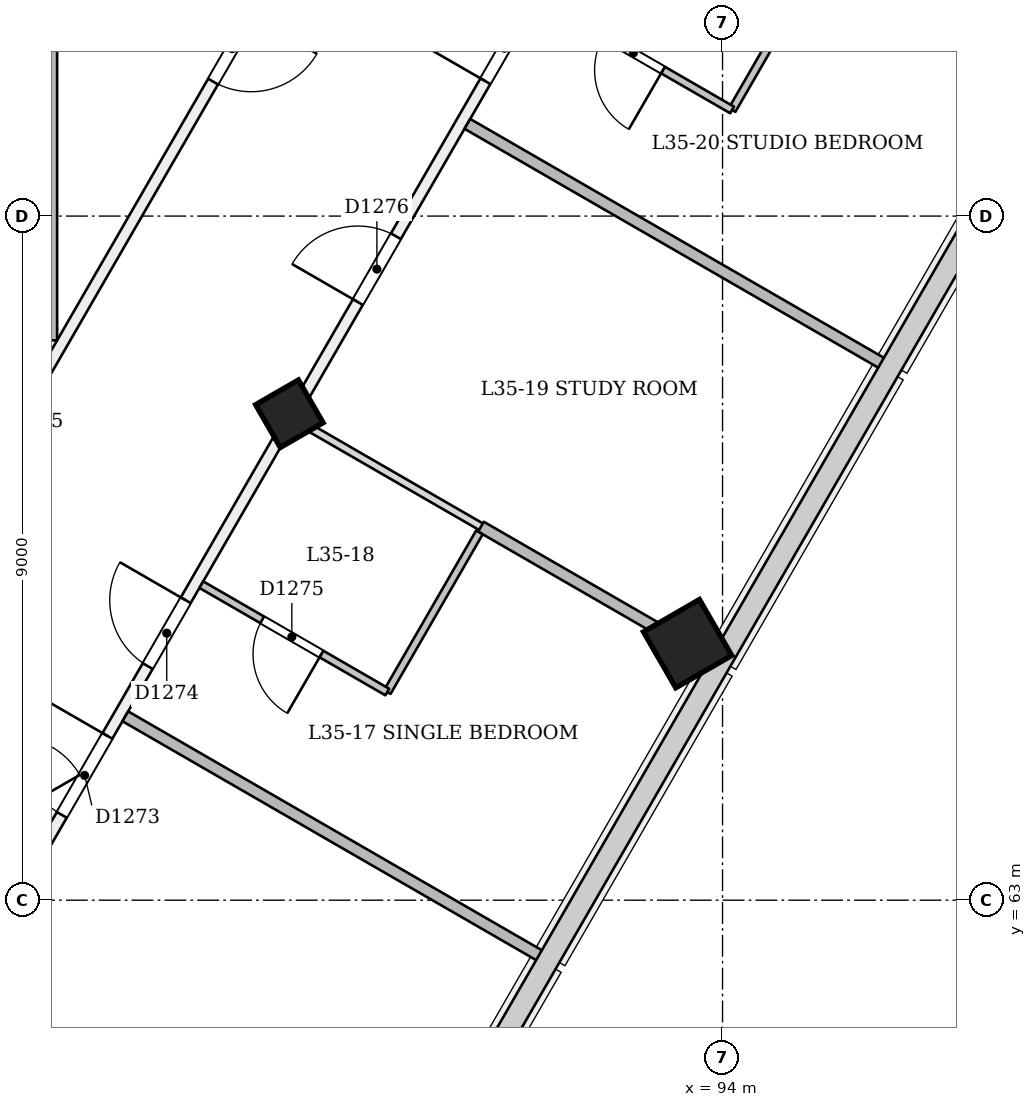
"""IFC4 building model, lengths in metres.
Left out: names, types, materials, properties, quantities, classifications, styles, units other than length and angle.
Written with IfcOpenShell. Run it as: python <this file> out.ifc"""

import sys

from ifc_helpers import new_model, si_unit, direction, frame, frame_2d, origin, origin_2d, place, context, subcontext, project, spatial, rectangle, extrude, element, fill, save


model = new_model("IFC4")
c1 = context("Model", 3, precision=1e-05, world=origin(), true_north=direction((0.0, 1.0)))
c2 = subcontext(c1, "Body", "Model", "MODEL_VIEW")
j1 = project(units=[si_unit("LENGTHUNIT", "METRE"), si_unit("PLANEANGLEUNIT", "RADIAN")], contexts=[c1])
p1 = place(None, origin())
s1 = spatial("IfcSite", under=j1, at=p1, CompositionType="ELEMENT")
p2 = place(p1, origin())
s2 = spatial("IfcBuilding", under=s1, at=p2, CompositionType="ELEMENT")
p3 = place(p2, frame((0.0, 0.0, 138.6)))
s3 = spatial("IfcBuildingStorey", under=s2, at=p3, CompositionType="ELEMENT", Elevation=138.6)
p4 = place(p3, frame((88.328, 69.353, -0.02), z_axis=(-0.022222852987, 0.038483477124, 0.999012095419), x_axis=(-0.500171952231, -0.865640981329, 0.022219577963)))
e1 = element("IfcColumn", 1, at=p4, inside=s3, PredefinedType="COLUMN", context=c2, shape_type="SweptSolid", body=[
    extrude(rectangle(XDim=0.65, YDim=0.65, at=origin_2d()), origin(), (0.0, 0.0, 1.0), 3.604),
])
p5 = place(p3, frame((93.568, 66.328, -0.026), z_axis=(-0.02215369191, 0.038413282303, 0.999016333038), x_axis=(-0.500654753295, -0.865363059712, 0.022171894109)))
e2 = element("IfcColumn", 2, at=p5, inside=s3, PredefinedType="COLUMN", context=c2, shape_type="SweptSolid", body=[
    extrude(rectangle(XDim=0.85, YDim=0.85, at=origin_2d()), origin(), (0.0, 0.0, 1.0), 3.604),
])
p6 = place(p3, frame((96.784, 90.2, 0.0), z_axis=(0.0, 0.0, 1.0), x_axis=(-0.499996251233, -0.866027568125, 0.0)))
e3 = element("IfcWall", 3, at=p6, inside=s3, PredefinedType="PARTITIONING", context=c2, shape_type="SweptSolid", body=[
    extrude(rectangle(XDim=23.568, YDim=0.15, at=frame_2d((11.784, 0.0))), origin(), (0.0, 0.0, 1.0), 3.15),
])
p7 = place(p6, frame((17.972, 0.0, 0.0)))
e4 = element("IfcOpeningElement", 4, at=p7, cuts=e3, PredefinedType="OPENING", context=c2, shape_type="SweptSolid", body=[
    extrude(rectangle(XDim=1.0, YDim=2.1, at=frame_2d((0.5, 1.05))), frame((0.0, 0.085, 0.0), z_axis=(0.0, -1.0, 0.0), x_axis=(1.0, 0.0, 0.0)), (0.0, 0.0, 1.0), 0.171),
])
p8 = place(p6, frame((13.976, 0.0, 0.0)))
e5 = element("IfcOpeningElement", 5, at=p8, cuts=e3, PredefinedType="OPENING", context=c2, shape_type="SweptSolid", body=[
    extrude(rectangle(XDim=1.0, YDim=2.1, at=frame_2d((0.5, 1.05))), frame((0.0, 0.085, 0.0), z_axis=(0.0, -1.0, 0.0), x_axis=(1.0, 0.0, 0.0)), (0.0, 0.0, 1.0), 0.171),
])
p9 = place(p6, frame((11.077, 0.0, 0.0)))
e6 = element("IfcOpeningElement", 6, at=p9, cuts=e3, PredefinedType="OPENING", context=c2, shape_type="SweptSolid", body=[
    extrude(rectangle(XDim=1.0, YDim=2.1, at=frame_2d((0.5, 1.05))), frame((0.0, 0.085, 0.0), z_axis=(0.0, -1.0, 0.0), x_axis=(1.0, 0.0, 0.0)), (0.0, 0.0, 1.0), 0.171),
])
p10 = place(p6, frame((7.656, 0.0, 0.0)))
e7 = element("IfcOpeningElement", 7, at=p10, cuts=e3, PredefinedType="OPENING", context=c2, shape_type="SweptSolid", body=[
    extrude(rectangle(XDim=1.0, YDim=2.1, at=frame_2d((0.5, 1.05))), frame((0.0, 0.085, 0.0), z_axis=(0.0, -1.0, 0.0), x_axis=(1.0, 0.0, 0.0)), (0.0, 0.0, 1.0), 0.171),
])
p11 = place(p6, frame((2.832, 0.0, 0.0)))
e8 = element("IfcOpeningElement", 8, at=p11, cuts=e3, PredefinedType="OPENING", context=c2, shape_type="SweptSolid", body=[
    extrude(rectangle(XDim=1.0, YDim=2.1, at=frame_2d((0.5, 1.05))), frame((0.0, 0.085, 0.0), z_axis=(0.0, -1.0, 0.0), x_axis=(1.0, 0.0, 0.0)), (0.0, 0.0, 1.0), 0.171),
])
p12 = place(p3, frame((85.054, 63.684, 0.0), z_axis=(0.0, 0.0, 1.0), x_axis=(0.499999704591, 0.866025574339, 0.0)))
e9 = element("IfcWall", 9, at=p12, inside=s3, PredefinedType="PARTITIONING", context=c2, shape_type="SweptSolid", body=[
    extrude(rectangle(XDim=40.094, YDim=0.15, at=frame_2d((20.047, 0.0))), origin(), (0.0, 0.0, 1.0), 2.75),
])
p13 = place(p12, frame((0.506, 0.0, 0.0)))
e10 = element("IfcOpeningElement", 10, at=p13, cuts=e9, PredefinedType="OPENING", context=c2, shape_type="SweptSolid", body=[
    extrude(rectangle(XDim=1.2, YDim=2.1, at=frame_2d((0.6, 1.05))), frame((0.0, 0.085, 0.0), z_axis=(0.0, -1.0, 0.0), x_axis=(1.0, 0.0, 0.0)), (0.0, 0.0, 1.0), 0.171),
])
p14 = place(p12, frame((2.767, 0.0, 0.0)))
e11 = element("IfcOpeningElement", 11, at=p14, cuts=e9, PredefinedType="OPENING", context=c2, shape_type="SweptSolid", body=[
    extrude(rectangle(XDim=1.0, YDim=2.1, at=frame_2d((0.5, 1.05))), frame((0.0, 0.085, 0.0), z_axis=(0.0, -1.0, 0.0), x_axis=(1.0, 0.0, 0.0)), (0.0, 0.0, 1.0), 0.171),
])
p15 = place(p12, frame((8.297, 0.0, 0.0)))
e12 = element("IfcOpeningElement", 12, at=p15, cuts=e9, PredefinedType="OPENING", context=c2, shape_type="SweptSolid", body=[
    extrude(rectangle(XDim=1.0, YDim=2.1, at=frame_2d((0.5, 1.05))), frame((0.0, 0.085, 0.0), z_axis=(0.0, -1.0, 0.0), x_axis=(1.0, 0.0, 0.0)), (0.0, 0.0, 1.0), 0.171),
])
p16 = place(p12, frame((11.652, 0.0, 0.0)))
e13 = element("IfcOpeningElement", 13, at=p16, cuts=e9, PredefinedType="OPENING", context=c2, shape_type="SweptSolid", body=[
    extrude(rectangle(XDim=1.0, YDim=2.1, at=frame_2d((0.5, 1.05))), frame((0.0, 0.085, 0.0), z_axis=(0.0, -1.0, 0.0), x_axis=(1.0, 0.0, 0.0)), (0.0, 0.0, 1.0), 0.171),
])
p17 = place(p12, frame((18.327, 0.0, 0.0)))
e14 = element("IfcOpeningElement", 14, at=p17, cuts=e9, PredefinedType="OPENING", context=c2, shape_type="SweptSolid", body=[
    extrude(rectangle(XDim=1.0, YDim=2.1, at=frame_2d((0.5, 1.05))), frame((0.0, 0.085, 0.0), z_axis=(0.0, -1.0, 0.0), x_axis=(1.0, 0.0, 0.0)), (0.0, 0.0, 1.0), 0.171),
])
p18 = place(p12, frame((20.767, 0.0, 0.0)))
e15 = element("IfcOpeningElement", 15, at=p18, cuts=e9, PredefinedType="OPENING", context=c2, shape_type="SweptSolid", body=[
    extrude(rectangle(XDim=1.0, YDim=2.1, at=frame_2d((0.5, 1.05))), frame((0.0, 0.085, 0.0), z_axis=(0.0, -1.0, 0.0), x_axis=(1.0, 0.0, 0.0)), (0.0, 0.0, 1.0), 0.171),
])
p19 = place(p12, frame((26.297, 0.0, 0.0)))
e16 = element("IfcOpeningElement", 16, at=p19, cuts=e9, PredefinedType="OPENING", context=c2, shape_type="SweptSolid", body=[
    extrude(rectangle(XDim=1.0, YDim=2.1, at=frame_2d((0.5, 1.05))), frame((0.0, 0.085, 0.0), z_axis=(0.0, -1.0, 0.0), x_axis=(1.0, 0.0, 0.0)), (0.0, 0.0, 1.0), 0.171),
])
p20 = place(p12, frame((31.847, 0.0, 0.0)))
e17 = element("IfcOpeningElement", 17, at=p20, cuts=e9, PredefinedType="OPENING", context=c2, shape_type="SweptSolid", body=[
    extrude(rectangle(XDim=1.2, YDim=2.1, at=frame_2d((0.6, 1.05))), frame((0.0, 0.085, 0.0), z_axis=(0.0, -1.0, 0.0), x_axis=(1.0, 0.0, 0.0)), (0.0, 0.0, 1.0), 0.171),
])
p21 = place(p12, frame((38.694, 0.0, 0.0)))
e18 = element("IfcOpeningElement", 18, at=p21, cuts=e9, PredefinedType="OPENING", context=c2, shape_type="SweptSolid", body=[
    extrude(rectangle(XDim=1.2, YDim=2.1, at=frame_2d((0.6, 1.05))), frame((0.0, 0.085, 0.0), z_axis=(0.0, -1.0, 0.0), x_axis=(1.0, 0.0, 0.0)), (0.0, 0.0, 1.0), 0.171),
])
p22 = place(p3, frame((85.171, 81.824, 0.0), z_axis=(0.0, 0.0, 1.0), x_axis=(0.0, -1.0, 0.0)))
e19 = element("IfcWall", 19, at=p22, inside=s3, PredefinedType="PARTITIONING", context=c2, shape_type="SweptSolid", body=[
    extrude(rectangle(XDim=11.459, YDim=0.15, at=frame_2d((5.729, 0.0))), origin(), (0.0, 0.0, 1.0), 3.15),
])
p23 = place(p3, frame((91.638, 62.246, 0.0), z_axis=(0.0, 0.0, 1.0), x_axis=(-0.866025401434, 0.500000004071, 0.0)))
e20 = element("IfcWall", 20, at=p23, inside=s3, PredefinedType="PARTITIONING", context=c2, shape_type="SweptSolid", body=[
    extrude(rectangle(XDim=6.345, YDim=0.15, at=frame_2d((3.173, 0.0))), origin(), (0.0, 0.0, 1.0), 2.65),
])
p24 = place(p3, frame((90.802, 67.839, 0.0), z_axis=(0.0, 0.0, 1.0), x_axis=(-0.500047793048, -0.865997808697, 0.0)))
e21 = element("IfcWall", 21, at=p24, inside=s3, PredefinedType="PARTITIONING", context=c2, shape_type="SweptSolid", body=[
    extrude(rectangle(XDim=2.425, YDim=0.1, at=frame_2d((1.212, 0.0))), origin(), (0.0, 0.0, 1.0), 2.75),
])
p25 = place(p3, frame((89.589, 65.739, 0.0), z_axis=(0.0, 0.0, 1.0), x_axis=(-0.866011447264, 0.500024172624, 0.0)))
e22 = element("IfcWall", 22, at=p25, inside=s3, PredefinedType="PARTITIONING", context=c2, shape_type="SweptSolid", body=[
    extrude(rectangle(XDim=2.825, YDim=0.1, at=frame_2d((1.413, 0.0))), origin(), (0.0, 0.0, 1.0), 3.15),
])
p26 = place(p25, frame((1.0, 0.0, 0.0)))
e23 = element("IfcOpeningElement", 23, at=p26, cuts=e22, PredefinedType="OPENING", context=c2, shape_type="SweptSolid", body=[
    extrude(rectangle(XDim=0.9, YDim=2.1, at=frame_2d((0.45, 1.05))), frame((0.0, 0.061, 0.0), z_axis=(0.0, -1.0, 0.0), x_axis=(1.0, 0.0, 0.0)), (0.0, 0.0, 1.0), 0.121),
])
p27 = place(p3, frame((93.87, 66.154, 0.0), z_axis=(0.0, 0.0, 1.0), x_axis=(-0.866036599697, 0.499980607609, 0.0)))
e24 = element("IfcWall", 24, at=p27, inside=s3, PredefinedType="PARTITIONING", context=c2, shape_type="SweptSolid", body=[
    extrude(rectangle(XDim=3.52, YDim=0.15, at=frame_2d((1.76, 0.0))), origin(), (0.0, 0.0, 1.0), 2.65),
])
p28 = place(p3, frame((90.856, 67.894, 0.0), z_axis=(0.0, 0.0, 1.0), x_axis=(-0.866011243319, 0.500024525844, 0.0)))
e25 = element("IfcWall", 25, at=p28, inside=s3, PredefinedType="PARTITIONING", context=c2, shape_type="SweptSolid", body=[
    extrude(rectangle(XDim=2.845, YDim=0.1, at=frame_2d((1.422, 0.0))), origin(), (0.0, 0.0, 1.0), 2.75),
])
p29 = place(p3, frame((96.138, 70.041, 0.0), z_axis=(0.0, 0.0, 1.0), x_axis=(-0.866025401434, 0.500000004071, 0.0)))
e26 = element("IfcWall", 26, at=p29, inside=s3, PredefinedType="PARTITIONING", context=c2, shape_type="SweptSolid", body=[
    extrude(rectangle(XDim=6.345, YDim=0.15, at=frame_2d((3.173, 0.0))), origin(), (0.0, 0.0, 1.0), 2.65),
])
p30 = place(p3, frame((95.388, 75.583, 0.0), z_axis=(0.0, 0.0, 1.0), x_axis=(-0.50001820224, -0.866014894461, 0.0)))
e27 = element("IfcWall", 27, at=p30, inside=s3, PredefinedType="PARTITIONING", context=c2, shape_type="SweptSolid", body=[
    extrude(rectangle(XDim=2.525, YDim=0.1, at=frame_2d((1.262, 0.0))), origin(), (0.0, 0.0, 1.0), 2.75),
])
p31 = place(p3, frame((94.126, 73.396, 0.0), z_axis=(0.0, 0.0, 1.0), x_axis=(-0.866046596414, 0.499963291492, 0.0)))
e28 = element("IfcWall", 28, at=p31, inside=s3, PredefinedType="PARTITIONING", context=c2, shape_type="SweptSolid", body=[
    extrude(rectangle(XDim=2.925, YDim=0.1, at=frame_2d((1.462, 0.0))), origin(), (0.0, 0.0, 1.0), 3.15),
])
p32 = place(p31, frame((1.05, 0.0, 0.0)))
e29 = element("IfcOpeningElement", 29, at=p32, cuts=e28, PredefinedType="OPENING", context=c2, shape_type="SweptSolid", body=[
    extrude(rectangle(XDim=0.9, YDim=2.1, at=frame_2d((0.45, 1.05))), frame((0.0, 0.061, 0.0), z_axis=(0.0, -1.0, 0.0), x_axis=(1.0, 0.0, 0.0)), (0.0, 0.0, 1.0), 0.121),
])
p33 = place(p3, frame((98.37, 73.948, 0.0), z_axis=(0.0, 0.0, 1.0), x_axis=(-0.866038183914, 0.499977863513, 0.0)))
e30 = element("IfcWall", 30, at=p33, inside=s3, PredefinedType="PARTITIONING", context=c2, shape_type="SweptSolid", body=[
    extrude(rectangle(XDim=3.42, YDim=0.15, at=frame_2d((1.71, 0.0))), origin(), (0.0, 0.0, 1.0), 2.65),
])
p34 = place(p7, origin())
e31 = element("IfcDoor", 31, at=p34, inside=s3, OperationType="SINGLE_SWING_LEFT", PredefinedType="NOTDEFINED", context=c2, shape_type="SweptSolid", body=[
    extrude(rectangle(XDim=1.0, YDim=2.1, at=frame_2d((0.5, 1.05))), frame((0.0, 0.025, 0.0), z_axis=(0.0, -1.0, 0.0), x_axis=(1.0, 0.0, 0.0)), (0.0, 0.0, 1.0), 0.05),
])
fill(e4, e31)
p35 = place(p13, origin())
e32 = element("IfcDoor", 32, at=p35, inside=s3, OperationType="SINGLE_SWING_RIGHT", PredefinedType="NOTDEFINED", context=c2, shape_type="SweptSolid", body=[
    extrude(rectangle(XDim=1.2, YDim=2.1, at=frame_2d((0.6, 1.05))), frame((0.0, 0.025, 0.0), z_axis=(0.0, -1.0, 0.0), x_axis=(1.0, 0.0, 0.0)), (0.0, 0.0, 1.0), 0.05),
])
fill(e10, e32)
p36 = place(p14, origin())
e33 = element("IfcDoor", 33, at=p36, inside=s3, OperationType="SINGLE_SWING_RIGHT", PredefinedType="NOTDEFINED", context=c2, shape_type="SweptSolid", body=[
    extrude(rectangle(XDim=1.0, YDim=2.1, at=frame_2d((0.5, 1.05))), frame((0.0, 0.025, 0.0), z_axis=(0.0, -1.0, 0.0), x_axis=(1.0, 0.0, 0.0)), (0.0, 0.0, 1.0), 0.05),
])
fill(e11, e33)
p37 = place(p26, origin())
e34 = element("IfcDoor", 34, at=p37, inside=s3, OperationType="SINGLE_SWING_LEFT", PredefinedType="NOTDEFINED", context=c2, shape_type="SweptSolid", body=[
    extrude(rectangle(XDim=0.9, YDim=2.1, at=frame_2d((0.45, 1.05))), frame((0.0, 0.025, 0.0), z_axis=(0.0, -1.0, 0.0), x_axis=(1.0, 0.0, 0.0)), (0.0, 0.0, 1.0), 0.05),
])
fill(e23, e34)
p38 = place(p15, origin())
e35 = element("IfcDoor", 35, at=p38, inside=s3, OperationType="SINGLE_SWING_LEFT", PredefinedType="NOTDEFINED", context=c2, shape_type="SweptSolid", body=[
    extrude(rectangle(XDim=1.0, YDim=2.1, at=frame_2d((0.5, 1.05))), frame((0.0, 0.025, 0.0), z_axis=(0.0, -1.0, 0.0), x_axis=(1.0, 0.0, 0.0)), (0.0, 0.0, 1.0), 0.05),
])
fill(e12, e35)
p39 = place(p16, origin())
e36 = element("IfcDoor", 36, at=p39, inside=s3, OperationType="SINGLE_SWING_LEFT", PredefinedType="NOTDEFINED", context=c2, shape_type="SweptSolid", body=[
    extrude(rectangle(XDim=1.0, YDim=2.1, at=frame_2d((0.5, 1.05))), frame((0.0, 0.025, 0.0), z_axis=(0.0, -1.0, 0.0), x_axis=(1.0, 0.0, 0.0)), (0.0, 0.0, 1.0), 0.05),
])
fill(e13, e36)
p40 = place(p32, origin())
e37 = element("IfcDoor", 37, at=p40, inside=s3, OperationType="SINGLE_SWING_LEFT", PredefinedType="NOTDEFINED", context=c2, shape_type="SweptSolid", body=[
    extrude(rectangle(XDim=0.9, YDim=2.1, at=frame_2d((0.45, 1.05))), frame((0.0, 0.025, 0.0), z_axis=(0.0, -1.0, 0.0), x_axis=(1.0, 0.0, 0.0)), (0.0, 0.0, 1.0), 0.05),
])
fill(e29, e37)
save(model, sys.argv[1])
